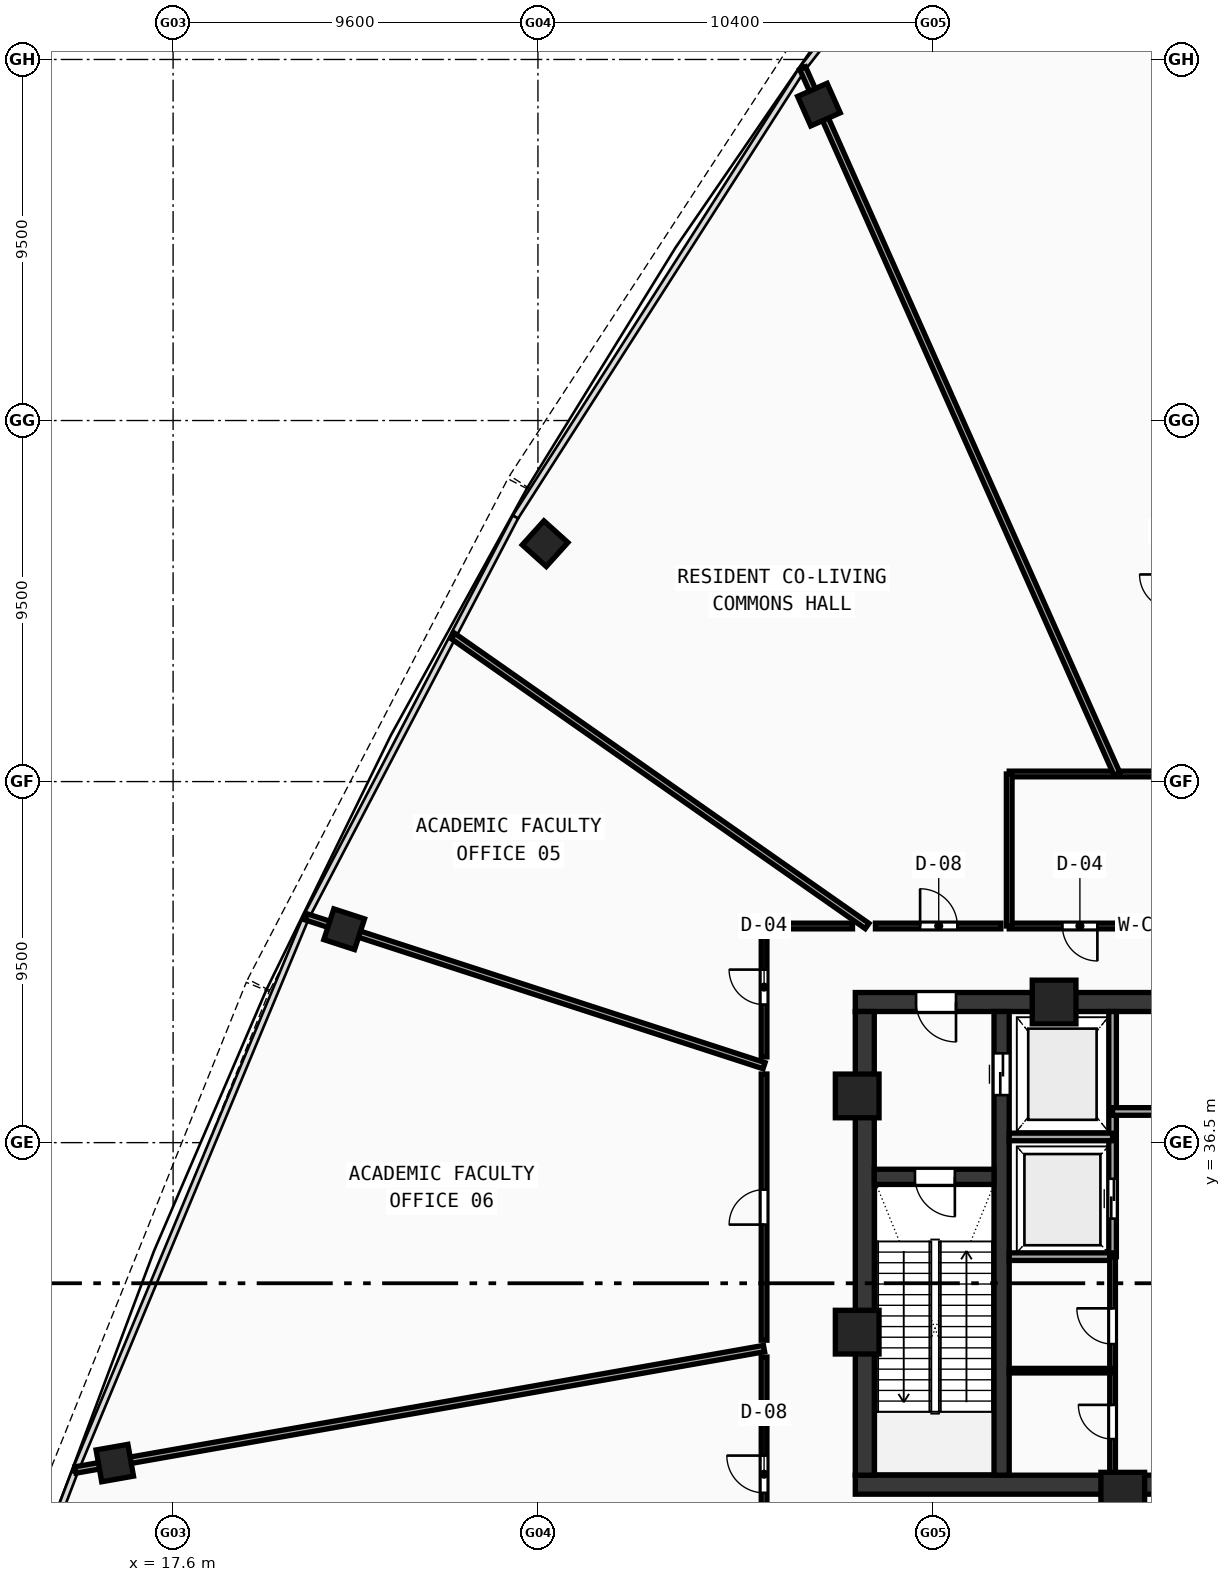
"""IFC4 building model, lengths in metres.
Left out: names, types, materials, properties, quantities, classifications, styles, units other than length and angle.
Written with IfcOpenShell. Run it as: python <this file> out.ifc"""

import sys

from ifc_helpers import new_model, si_unit, direction, frame, frame_2d, origin, origin_with_axes, origin_2d, place, context, subcontext, project, spatial, rectangle, hollow_rectangle, extrude, source, transform, mapped, element, fill, save


model = new_model("IFC4")
c1 = context("Model", 3, precision=1e-05, world=origin(), true_north=direction((0.0, 1.0)))
c2 = subcontext(c1, "Body", "Model", "MODEL_VIEW")
j1 = project(units=[si_unit("LENGTHUNIT", "METRE"), si_unit("PLANEANGLEUNIT", "RADIAN")], contexts=[c1])
p1 = place(None, origin())
s1 = spatial("IfcSite", under=j1, at=p1, CompositionType="ELEMENT")
p2 = place(p1, origin())
s2 = spatial("IfcBuilding", under=s1, at=p2, CompositionType="ELEMENT")
p3 = place(p2, frame((0.0, 0.0, 266.91)))
s3 = spatial("IfcBuildingStorey", under=s2, at=p3, CompositionType="ELEMENT", Elevation=266.91)
p4 = place(p3, frame((35.55, 27.5, 0.0), z_axis=(0.0, 0.0, 1.0), x_axis=(1.0, 0.0, 0.0)))
e1 = element("IfcWall", 1, at=p4, inside=s3, PredefinedType="SHEAR", context=c2, shape_type="SweptSolid", body=[
    extrude(rectangle(XDim=24.9, YDim=0.5, at=frame_2d((12.45, 0.0))), origin(), (0.0, 0.0, 1.0), 5.57),
])
p5 = place(p3, frame((35.55, 40.2, 0.0), z_axis=(0.0, 0.0, 1.0), x_axis=(1.0, 0.0, 0.0)))
e2 = element("IfcWall", 2, at=p5, inside=s3, PredefinedType="SHEAR", context=c2, shape_type="SweptSolid", body=[
    extrude(rectangle(XDim=11.25, YDim=0.5, at=frame_2d((5.625, 0.0))), origin(), (0.0, 0.0, 1.0), 5.57),
])
p6 = place(p5, frame((1.6, 0.0, 0.0)))
e3 = element("IfcOpeningElement", 3, at=p6, cuts=e2, PredefinedType="OPENING", context=c2, shape_type="SweptSolid", body=[
    extrude(rectangle(XDim=1.05, YDim=2.1, at=frame_2d((0.525, 1.05))), frame((0.0, 0.26, 0.0), z_axis=(0.0, -1.0, 0.0), x_axis=(1.0, 0.0, 0.0)), (0.0, 0.0, 1.0), 0.52),
])
p7 = place(p3, frame((35.8, 27.75, 0.0), z_axis=(0.0, 0.0, 1.0), x_axis=(0.0, 1.0, 0.0)))
e4 = element("IfcWall", 4, at=p7, inside=s3, PredefinedType="SHEAR", context=c2, shape_type="SweptSolid", body=[
    extrude(rectangle(XDim=12.2, YDim=0.5, at=frame_2d((6.1, 0.0))), origin(), (0.0, 0.0, 1.0), 5.57),
])
p8 = place(p3, frame((39.4, 27.75, 0.0), z_axis=(0.0, 0.0, 1.0), x_axis=(0.0, 1.0, 0.0)))
e5 = element("IfcWall", 5, at=p8, inside=s3, PredefinedType="SHEAR", context=c2, shape_type="SweptSolid", body=[
    extrude(rectangle(XDim=12.2, YDim=0.4, at=frame_2d((6.1, 0.0))), origin(), (0.0, 0.0, 1.0), 5.57),
])
p9 = place(p8, frame((10.0, 0.0, 0.0)))
e6 = element("IfcOpeningElement", 6, at=p9, cuts=e5, PredefinedType="OPENING", context=c2, shape_type="SweptSolid", body=[
    extrude(rectangle(XDim=1.1, YDim=2.1, at=frame_2d((0.55, 1.05))), frame((0.0, 0.21, 0.0), z_axis=(0.0, -1.0, 0.0), x_axis=(1.0, 0.0, 0.0)), (0.0, 0.0, 1.0), 0.42),
])
p10 = place(p3, frame((36.05, 35.6, 0.0), z_axis=(0.0, 0.0, 1.0), x_axis=(1.0, 0.0, 0.0)))
e7 = element("IfcWall", 7, at=p10, inside=s3, PredefinedType="SHEAR", context=c2, shape_type="SweptSolid", body=[
    extrude(rectangle(XDim=3.15, YDim=0.4, at=frame_2d((1.575, 0.0))), origin(), (0.0, 0.0, 1.0), 5.57),
])
p11 = place(p10, frame((1.07, 0.0, 0.0)))
e8 = element("IfcOpeningElement", 8, at=p11, cuts=e7, PredefinedType="OPENING", context=c2, shape_type="SweptSolid", body=[
    extrude(rectangle(XDim=1.05, YDim=2.1, at=frame_2d((0.525, 1.05))), frame((0.0, 0.21, 0.0), z_axis=(0.0, -1.0, 0.0), x_axis=(1.0, 0.0, 0.0)), (0.0, 0.0, 1.0), 0.42),
])
m1 = source(origin(), c2, "Body", "SweptSolid", [
    extrude(hollow_rectangle(XDim=1.15, YDim=1.15, WallThickness=0.048, at=origin_2d()), origin(), (0.0, 0.0, 1.0), 5.83),
])
for number, where, z_axis, x_axis in (
    (9, (42.588, 27.25, -0.26), (0.0, 0.0, 1.0), (1.0, 0.0, 0.0)),
    (10, (40.781, 40.2, -0.26), (0.0, 0.0, 1.0), (1.0, 0.0, 0.0)),
    (11, (35.6, 37.729, -0.26), (0.0, 0.0, 1.0), (1.0, 0.0, 0.0)),
    (12, (35.6, 31.513, -0.26), (0.0, 0.0, 1.0), (1.0, 0.0, 0.0)),
):
    element("IfcColumn", number, at=place(p3, frame(where, z_axis=z_axis, x_axis=x_axis)), inside=s3, PredefinedType="COLUMN", context=c2, shape_type="MappedRepresentation", body=[
        mapped(m1, transform((0.0, 0.0, 0.0), scale=1.0)),
    ])
m2 = source(origin(), c2, "Body", "SweptSolid", [
    extrude(hollow_rectangle(XDim=0.85, YDim=0.85, WallThickness=0.034, at=origin_2d()), origin(), (0.0, 0.0, 1.0), 5.83),
])
for number, where, z_axis, x_axis in (
    (13, (34.593, 63.812, -0.26), (0.0, 0.0, 1.0), (-0.914, -0.407, 0.0)),
    (14, (27.388, 52.259, -0.26), (0.0, 0.0, 1.0), (-0.669, -0.743, 0.0)),
    (15, (22.102, 42.115, -0.26), (0.0, 0.0, 1.0), (-0.309, -0.951, 0.0)),
    (16, (16.066, 28.069, -0.26), (0.0, 0.0, 1.0), (0.174, -0.985, 0.0)),
):
    element("IfcColumn", number, at=place(p3, frame(where, z_axis=z_axis, x_axis=x_axis)), inside=s3, PredefinedType="COLUMN", context=c2, shape_type="MappedRepresentation", body=[
        mapped(m2, transform((0.0, 0.0, 0.0), scale=1.0)),
    ])
p12 = place(p3, frame((42.32, 33.5, 0.0), z_axis=(0.0, 0.0, 1.0), x_axis=(0.0, 1.0, 0.0)))
e17 = element("IfcWall", 17, at=p12, inside=s3, PredefinedType="SOLIDWALL", context=c2, shape_type="SweptSolid", body=[
    extrude(rectangle(XDim=6.45, YDim=0.2, at=frame_2d((3.225, 0.0))), origin(), (0.0, 0.0, 1.0), 5.57),
])
p13 = place(p12, frame((1.0, 0.0, 0.0)))
e18 = element("IfcOpeningElement", 18, at=p13, cuts=e17, PredefinedType="OPENING", context=c2, shape_type="SweptSolid", body=[
    extrude(rectangle(XDim=1.05, YDim=2.1, at=frame_2d((0.525, 1.05))), frame((0.0, 0.11, 0.0), z_axis=(0.0, -1.0, 0.0), x_axis=(1.0, 0.0, 0.0)), (0.0, 0.0, 1.0), 0.22),
])
for number, where, z_axis, x_axis in (
    (19, (39.6, 36.65, 0.0), (0.0, 0.0, 1.0), (1.0, 0.0, 0.0)),
    (20, (39.6, 33.5, 0.0), (0.0, 0.0, 1.0), (1.0, 0.0, 0.0)),
):
    element("IfcWall", number, at=place(p3, frame(where, z_axis=z_axis, x_axis=x_axis)), inside=s3, PredefinedType="SOLIDWALL", context=c2, shape_type="SweptSolid", body=[
        extrude(rectangle(XDim=2.72, YDim=0.2, at=frame_2d((1.36, 0.0))), origin(), (0.0, 0.0, 1.0), 5.57),
    ])
p14 = place(p3, frame((42.32, 37.32, 0.0), z_axis=(0.0, 0.0, 1.0), x_axis=(1.0, 0.0, 0.0)))
e21 = element("IfcWall", 21, at=p14, inside=s3, PredefinedType="SOLIDWALL", context=c2, shape_type="SweptSolid", body=[
    extrude(rectangle(XDim=4.73, YDim=0.2, at=frame_2d((2.365, 0.0))), origin(), (0.0, 0.0, 1.0), 5.57),
])
p15 = place(p14, frame((1.8, 0.0, 0.0)))
e22 = element("IfcOpeningElement", 22, at=p15, cuts=e21, PredefinedType="OPENING", context=c2, shape_type="SweptSolid", body=[
    extrude(rectangle(XDim=0.9, YDim=2.1, at=frame_2d((0.45, 1.05))), frame((0.0, 0.11, 0.0), z_axis=(0.0, -1.0, 0.0), x_axis=(1.0, 0.0, 0.0)), (0.0, 0.0, 1.0), 0.22),
])
p16 = place(p3, frame((42.32, 27.6, 0.0), z_axis=(0.0, 0.0, 1.0), x_axis=(0.0, 1.0, 0.0)))
e23 = element("IfcWall", 23, at=p16, inside=s3, PredefinedType="PARTITIONING", context=c2, shape_type="SweptSolid", body=[
    extrude(rectangle(XDim=5.9, YDim=0.15, at=frame_2d((2.95, 0.0))), origin(), (0.0, 0.0, 1.0), 2.22),
])
p17 = place(p16, frame((1.1, 0.0, 0.0)))
e24 = element("IfcOpeningElement", 24, at=p17, cuts=e23, PredefinedType="OPENING", context=c2, shape_type="SweptSolid", body=[
    extrude(rectangle(XDim=0.9, YDim=2.1, at=frame_2d((0.45, 1.05))), frame((0.0, 0.085, 0.0), z_axis=(0.0, -1.0, 0.0), x_axis=(1.0, 0.0, 0.0)), (0.0, 0.0, 1.0), 0.17),
])
p18 = place(p16, frame((3.6, 0.0, 0.0)))
e25 = element("IfcOpeningElement", 25, at=p18, cuts=e23, PredefinedType="OPENING", context=c2, shape_type="SweptSolid", body=[
    extrude(rectangle(XDim=0.94, YDim=2.1, at=frame_2d((0.47, 1.05))), frame((0.0, 0.085, 0.0), z_axis=(0.0, -1.0, 0.0), x_axis=(1.0, 0.0, 0.0)), (0.0, 0.0, 1.0), 0.17),
])
p19 = place(p3, frame((39.6, 30.5, 0.0), z_axis=(0.0, 0.0, 1.0), x_axis=(1.0, 0.0, 0.0)))
e26 = element("IfcWall", 26, at=p19, inside=s3, PredefinedType="PARTITIONING", context=c2, shape_type="SweptSolid", body=[
    extrude(rectangle(XDim=2.72, YDim=0.12, at=frame_2d((1.36, 0.0))), origin(), (0.0, 0.0, 1.0), 5.57),
])
p20 = place(p3, frame((39.6, 42.2, 0.0), z_axis=(0.0, 0.0, 1.0), x_axis=(1.0, 0.0, 0.0)))
e27 = element("IfcWall", 27, at=p20, inside=s3, PredefinedType="PARTITIONING", context=c2, shape_type="SweptSolid", body=[
    extrude(rectangle(XDim=4.35, YDim=0.15, at=frame_2d((2.175, 0.0))), origin(), (0.0, 0.0, 1.0), 2.22),
])
p21 = place(p20, frame((1.4, 0.0, 0.0)))
e28 = element("IfcOpeningElement", 28, at=p21, cuts=e27, PredefinedType="OPENING", context=c2, shape_type="SweptSolid", body=[
    extrude(rectangle(XDim=0.92, YDim=2.1, at=frame_2d((0.46, 1.05))), frame((0.0, 0.085, 0.0), z_axis=(0.0, -1.0, 0.0), x_axis=(1.0, 0.0, 0.0)), (0.0, 0.0, 1.0), 0.17),
])
p22 = place(p3, frame((39.6, 46.2, 0.0), z_axis=(0.0, 0.0, 1.0), x_axis=(1.0, 0.0, 0.0)))
e29 = element("IfcWall", 29, at=p22, inside=s3, PredefinedType="PARTITIONING", context=c2, shape_type="SweptSolid", body=[
    extrude(rectangle(XDim=4.35, YDim=0.15, at=frame_2d((2.175, 0.0))), origin(), (0.0, 0.0, 1.0), 2.22),
])
p23 = place(p3, frame((39.6, 42.2, 0.0), z_axis=(0.0, 0.0, 1.0), x_axis=(0.0, 1.0, 0.0)))
e30 = element("IfcWall", 30, at=p23, inside=s3, PredefinedType="PARTITIONING", context=c2, shape_type="SweptSolid", body=[
    extrude(rectangle(XDim=4.0, YDim=0.15, at=frame_2d((2.0, 0.0))), origin(), (0.0, 0.0, 1.0), 5.22),
])
p24 = place(p3, frame((42.435, 46.2, 0.0), z_axis=(0.0, 0.0, 1.0), x_axis=(-0.406734534197, 0.913546396573, 0.0)))
e31 = element("IfcWall", 31, at=p24, inside=s3, PredefinedType="PARTITIONING", context=c2, shape_type="SweptSolid", body=[
    extrude(rectangle(XDim=20.329, YDim=0.17, at=frame_2d((10.164, 0.0))), origin(), (0.0, 0.0, 1.0), 2.22),
])
p25 = place(p3, frame((35.861, 42.2, 0.0), z_axis=(0.0, 0.0, 1.0), x_axis=(-0.819147381932, 0.57358309483, 0.0)))
e32 = element("IfcWall", 32, at=p25, inside=s3, PredefinedType="PARTITIONING", context=c2, shape_type="SweptSolid", body=[
    extrude(rectangle(XDim=13.297, YDim=0.17, at=frame_2d((6.649, 0.0))), origin(), (0.0, 0.0, 1.0), 4.92),
])
p26 = place(p3, frame((33.15, 38.525, 0.0), z_axis=(0.0, 0.0, 1.0), x_axis=(-0.951057436246, 0.309014163043, 0.0)))
e33 = element("IfcWall", 33, at=p26, inside=s3, PredefinedType="PARTITIONING", context=c2, shape_type="SweptSolid", body=[
    extrude(rectangle(XDim=12.667, YDim=0.17, at=frame_2d((6.333, 0.0))), origin(), (0.0, 0.0, 1.0), 2.22),
])
p27 = place(p3, frame((33.15, 31.082, 0.0), z_axis=(0.0, 0.0, 1.0), x_axis=(-0.984806394916, -0.173655879639, 0.0)))
e34 = element("IfcWall", 34, at=p27, inside=s3, PredefinedType="PARTITIONING", context=c2, shape_type="SweptSolid", body=[
    extrude(rectangle(XDim=18.397, YDim=0.17, at=frame_2d((9.199, 0.0))), origin(), (0.0, 0.0, 1.0), 2.22),
])
p28 = place(p3, frame((33.15, 24.9, 0.0), z_axis=(0.0, 0.0, 1.0), x_axis=(0.0, 1.0, 0.0)))
e35 = element("IfcWall", 35, at=p28, inside=s3, PredefinedType="PARTITIONING", context=c2, shape_type="SweptSolid", body=[
    extrude(rectangle(XDim=5.958, YDim=0.15, at=frame_2d((2.979, 0.0))), origin(), (0.0, 0.0, 1.0), 2.22),
])
p29 = place(p28, frame((2.386, 0.0, 0.0)))
e36 = element("IfcOpeningElement", 36, at=p29, cuts=e35, PredefinedType="OPENING", context=c2, shape_type="SweptSolid", body=[
    extrude(rectangle(XDim=0.98, YDim=2.12, at=frame_2d((0.49, 1.06))), frame((0.0, 0.085, 0.0), z_axis=(0.0, -1.0, 0.0), x_axis=(1.0, 0.0, 0.0)), (0.0, 0.0, 1.0), 0.17),
])
p30 = place(p3, frame((33.15, 31.301, 0.0), z_axis=(0.0, 0.0, 1.0), x_axis=(0.0, 1.0, 0.0)))
e37 = element("IfcWall", 37, at=p30, inside=s3, PredefinedType="PARTITIONING", context=c2, shape_type="SweptSolid", body=[
    extrude(rectangle(XDim=7.004, YDim=0.15, at=frame_2d((3.502, 0.0))), origin(), (0.0, 0.0, 1.0), 2.22),
])
p31 = place(p30, frame((3.042, 0.0, 0.0)))
e38 = element("IfcOpeningElement", 38, at=p31, cuts=e37, PredefinedType="OPENING", context=c2, shape_type="SweptSolid", body=[
    extrude(rectangle(XDim=0.92, YDim=2.1, at=frame_2d((0.46, 1.05))), frame((0.0, 0.085, 0.0), z_axis=(0.0, -1.0, 0.0), x_axis=(1.0, 0.0, 0.0)), (0.0, 0.0, 1.0), 0.17),
])
p32 = place(p3, frame((33.15, 38.756, 0.0), z_axis=(0.0, 0.0, 1.0), x_axis=(0.0, 1.0, 0.0)))
e39 = element("IfcWall", 39, at=p32, inside=s3, PredefinedType="PARTITIONING", context=c2, shape_type="SweptSolid", body=[
    extrude(rectangle(XDim=3.444, YDim=0.15, at=frame_2d((1.722, 0.0))), origin(), (0.0, 0.0, 1.0), 2.22),
])
p33 = place(p32, frame((1.376, 0.0, 0.0)))
e40 = element("IfcOpeningElement", 40, at=p33, cuts=e39, PredefinedType="OPENING", context=c2, shape_type="SweptSolid", body=[
    extrude(rectangle(XDim=0.92, YDim=2.1, at=frame_2d((0.46, 1.05))), frame((0.0, 0.085, 0.0), z_axis=(0.0, -1.0, 0.0), x_axis=(1.0, 0.0, 0.0)), (0.0, 0.0, 1.0), 0.17),
])
p34 = place(p3, frame((33.15, 42.2, 0.0), z_axis=(0.0, 0.0, 1.0), x_axis=(1.0, 0.0, 0.0)))
e41 = element("IfcWall", 41, at=p34, inside=s3, PredefinedType="PARTITIONING", context=c2, shape_type="SweptSolid", body=[
    extrude(rectangle(XDim=2.327, YDim=0.15, at=frame_2d((1.164, 0.0))), origin(), (0.0, 0.0, 1.0), 5.22),
])
p35 = place(p3, frame((36.081, 42.2, 0.0), z_axis=(0.0, 0.0, 1.0), x_axis=(1.0, 0.0, 0.0)))
e42 = element("IfcWall", 42, at=p35, inside=s3, PredefinedType="PARTITIONING", context=c2, shape_type="SweptSolid", body=[
    extrude(rectangle(XDim=3.299, YDim=0.15, at=frame_2d((1.65, 0.0))), origin(), (0.0, 0.0, 1.0), 2.22),
])
p36 = place(p35, frame((1.175, 0.0, 0.0)))
e43 = element("IfcOpeningElement", 43, at=p36, cuts=e42, PredefinedType="OPENING", context=c2, shape_type="SweptSolid", body=[
    extrude(rectangle(XDim=0.98, YDim=2.12, at=frame_2d((0.49, 1.06))), frame((0.0, 0.085, 0.0), z_axis=(0.0, -1.0, 0.0), x_axis=(1.0, 0.0, 0.0)), (0.0, 0.0, 1.0), 0.17),
])
m3 = source(origin(), c2, "Body", "SweptSolid", [
    extrude(rectangle(XDim=1.05, YDim=2.1, at=frame_2d((0.525, 1.05))), frame((0.0, 0.025, 0.0), z_axis=(0.0, -1.0, 0.0), x_axis=(1.0, 0.0, 0.0)), (0.0, 0.0, 1.0), 0.05),
])
p37 = place(p11, frame((1.05, 0.0, 0.0), z_axis=(0.0, 0.0, 1.0), x_axis=(-1.0, 0.0, 0.0)))
e44 = element("IfcDoor", 44, at=p37, inside=s3, OperationType="SINGLE_SWING_LEFT", PredefinedType="DOOR", context=c2, shape_type="MappedRepresentation", body=[
    mapped(m3, transform((0.0, 0.0, 0.0), scale=1.0)),
])
fill(e8, e44)
p38 = place(p6, frame((1.05, 0.0, 0.0), z_axis=(0.0, 0.0, 1.0), x_axis=(-1.0, 0.0, 0.0)))
e45 = element("IfcDoor", 45, at=p38, inside=s3, OperationType="SINGLE_SWING_LEFT", PredefinedType="DOOR", context=c2, shape_type="MappedRepresentation", body=[
    mapped(m3, transform((0.0, 0.0, 0.0), scale=1.0)),
])
fill(e3, e45)
m4 = source(origin(), c2, "Body", "SweptSolid", [
    extrude(rectangle(XDim=1.1, YDim=2.1, at=frame_2d((0.55, 1.05))), frame((0.0, 0.025, 0.0), z_axis=(0.0, -1.0, 0.0), x_axis=(1.0, 0.0, 0.0)), (0.0, 0.0, 1.0), 0.05),
])
p39 = place(p9, frame((1.1, 0.0, 0.0), z_axis=(0.0, 0.0, 1.0), x_axis=(-1.0, 0.0, 0.0)))
e46 = element("IfcDoor", 46, at=p39, inside=s3, OperationType="DOUBLE_DOOR_SLIDING", PredefinedType="DOOR", context=c2, shape_type="MappedRepresentation", body=[
    mapped(m4, transform((0.0, 0.0, 0.0), scale=1.0)),
])
fill(e6, e46)
p40 = place(p13, origin_with_axes())
e47 = element("IfcDoor", 47, at=p40, inside=s3, OperationType="DOUBLE_DOOR_SLIDING", PredefinedType="DOOR", context=c2, shape_type="MappedRepresentation", body=[
    mapped(m3, transform((0.0, 0.0, 0.0), scale=1.0)),
])
fill(e18, e47)
m5 = source(origin(), c2, "Body", "SweptSolid", [
    extrude(rectangle(XDim=0.9, YDim=2.1, at=frame_2d((0.45, 1.05))), frame((0.0, 0.025, 0.0), z_axis=(0.0, -1.0, 0.0), x_axis=(1.0, 0.0, 0.0)), (0.0, 0.0, 1.0), 0.05),
])
p41 = place(p17, origin_with_axes())
e48 = element("IfcDoor", 48, at=p41, inside=s3, OperationType="SINGLE_SWING_RIGHT", PredefinedType="DOOR", context=c2, shape_type="MappedRepresentation", body=[
    mapped(m5, transform((0.0, 0.0, 0.0), scale=1.0)),
])
fill(e24, e48)
m6 = source(origin(), c2, "Body", "SweptSolid", [
    extrude(rectangle(XDim=0.94, YDim=2.1, at=frame_2d((0.47, 1.05))), frame((0.0, 0.025, 0.0), z_axis=(0.0, -1.0, 0.0), x_axis=(1.0, 0.0, 0.0)), (0.0, 0.0, 1.0), 0.05),
])
p42 = place(p18, origin_with_axes())
e49 = element("IfcDoor", 49, at=p42, inside=s3, OperationType="SINGLE_SWING_RIGHT", PredefinedType="DOOR", context=c2, shape_type="MappedRepresentation", body=[
    mapped(m6, transform((0.0, 0.0, 0.0), scale=1.0)),
])
fill(e25, e49)
m7 = source(origin(), c2, "Body", "SweptSolid", [
    extrude(rectangle(XDim=0.92, YDim=2.1, at=frame_2d((0.46, 1.05))), frame((0.0, 0.025, 0.0), z_axis=(0.0, -1.0, 0.0), x_axis=(1.0, 0.0, 0.0)), (0.0, 0.0, 1.0), 0.05),
])
p43 = place(p21, frame((0.92, 0.0, 0.0), z_axis=(0.0, 0.0, 1.0), x_axis=(-1.0, 0.0, 0.0)))
e50 = element("IfcDoor", 50, at=p43, inside=s3, OperationType="SINGLE_SWING_LEFT", PredefinedType="DOOR", context=c2, shape_type="MappedRepresentation", body=[
    mapped(m7, transform((0.0, 0.0, 0.0), scale=1.0)),
])
fill(e28, e50)
m8 = source(origin(), c2, "Body", "SweptSolid", [
    extrude(rectangle(XDim=0.98, YDim=2.12, at=frame_2d((0.49, 1.06))), frame((0.0, 0.025, 0.0), z_axis=(0.0, -1.0, 0.0), x_axis=(1.0, 0.0, 0.0)), (0.0, 0.0, 1.0), 0.05),
])
p44 = place(p36, origin_with_axes())
e51 = element("IfcDoor", 51, at=p44, inside=s3, OperationType="SINGLE_SWING_LEFT", PredefinedType="DOOR", context=c2, shape_type="MappedRepresentation", body=[
    mapped(m8, transform((0.0, 0.0, 0.0), scale=1.0)),
])
fill(e43, e51)
p45 = place(p33, origin_with_axes())
e52 = element("IfcDoor", 52, at=p45, inside=s3, OperationType="SINGLE_SWING_RIGHT", PredefinedType="DOOR", context=c2, shape_type="MappedRepresentation", body=[
    mapped(m7, transform((0.0, 0.0, 0.0), scale=1.0)),
])
fill(e40, e52)
p46 = place(p31, origin_with_axes())
e53 = element("IfcDoor", 53, at=p46, inside=s3, OperationType="SINGLE_SWING_LEFT", PredefinedType="DOOR", context=c2, shape_type="MappedRepresentation", body=[
    mapped(m7, transform((0.0, 0.0, 0.0), scale=1.0)),
])
fill(e38, e53)
p47 = place(p29, origin_with_axes())
e54 = element("IfcDoor", 54, at=p47, inside=s3, OperationType="SINGLE_SWING_RIGHT", PredefinedType="DOOR", context=c2, shape_type="MappedRepresentation", body=[
    mapped(m8, transform((0.0, 0.0, 0.0), scale=1.0)),
])
fill(e36, e54)
save(model, sys.argv[1])
